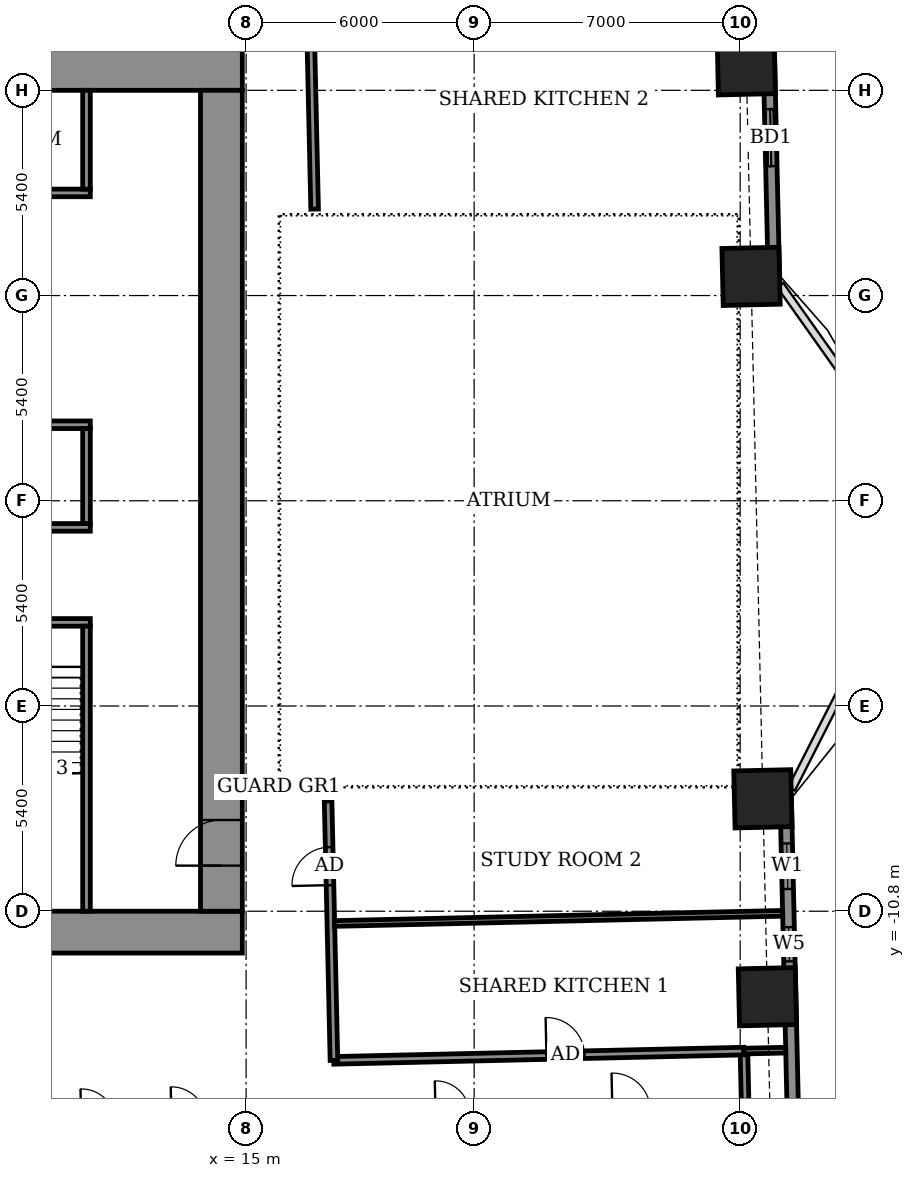
"""IFC4 building model, lengths in metres.
Left out: names, types, materials, properties, quantities, classifications, styles, units other than length and angle.
Written with IfcOpenShell. Run it as: python <this file> out.ifc"""

import sys

from ifc_helpers import new_model, si_unit, direction, frame, frame_2d, origin, origin_2d, place, context, subcontext, project, spatial, rectangle, extrude, element, fill, save


model = new_model("IFC4")
c1 = context("Model", 3, precision=1e-05, world=origin(), true_north=direction((0.0, 1.0)))
c2 = subcontext(c1, "Body", "Model", "MODEL_VIEW")
j1 = project(units=[si_unit("LENGTHUNIT", "METRE"), si_unit("PLANEANGLEUNIT", "RADIAN")], contexts=[c1])
p1 = place(None, origin())
s1 = spatial("IfcSite", under=j1, at=p1, CompositionType="ELEMENT")
p2 = place(p1, origin())
s2 = spatial("IfcBuilding", under=s1, at=p2, CompositionType="ELEMENT")
p3 = place(p2, frame((0.0, 0.0, 48.5)))
s3 = spatial("IfcBuildingStorey", under=s2, at=p3, CompositionType="ELEMENT", Elevation=48.5)
for number, where, z_axis, x_axis in (
    (1, (28.716, -13.049, -0.55), (0.0, 0.0, 1.0), (-0.023, 1.0, 0.0)),
    (2, (28.598, -7.842, -0.55), (0.0, 0.0, 1.0), (-0.023, 1.0, 0.0)),
    (3, (28.286, 5.905, -0.55), (0.0, 0.0, 1.0), (-0.023, 1.0, 0.0)),
    (4, (28.16, 11.445, -0.55), (0.0, 0.0, 1.0), (-0.023, 1.0, 0.0)),
):
    element("IfcColumn", number, at=place(p3, frame(where, z_axis=z_axis, x_axis=x_axis)), inside=s3, PredefinedType="COLUMN", context=c2, shape_type="SweptSolid", body=[
        extrude(rectangle(XDim=1.5, YDim=1.5, at=origin_2d()), origin(), (0.0, 0.0, 1.0), 3.6),
    ])
p4 = place(p3, frame((29.549, -23.299, 0.0), z_axis=(0.0, 0.0, 1.0), x_axis=(-0.022670336976, 0.999742994885, 0.0)))
e5 = element("IfcWall", 5, at=p4, inside=s3, PredefinedType="SOLIDWALL", context=c2, shape_type="SweptSolid", body=[
    extrude(rectangle(XDim=15.529, YDim=0.3, at=frame_2d((7.765, 0.0))), origin(), (0.0, 0.0, 1.0), 3.05),
])
p5 = place(p4, frame((2.119, 0.0, 0.0)))
e6 = element("IfcOpeningElement", 6, at=p5, cuts=e5, PredefinedType="OPENING", context=c2, shape_type="SweptSolid", body=[
    extrude(rectangle(XDim=1.5, YDim=2.4, at=frame_2d((0.75, 1.2))), frame((0.0, 0.16, 0.0), z_axis=(0.0, -1.0, 0.0), x_axis=(1.0, 0.0, 0.0)), (0.0, 0.0, 1.0), 0.32),
])
p6 = place(p4, frame((11.183, 0.0, 0.9)))
e7 = element("IfcOpeningElement", 7, at=p6, cuts=e5, PredefinedType="OPENING", context=c2, shape_type="SweptSolid", body=[
    extrude(rectangle(XDim=0.9, YDim=1.5, at=frame_2d((0.45, 0.75))), frame((0.0, 0.16, 0.0), z_axis=(0.0, -1.0, 0.0), x_axis=(1.0, 0.0, 0.0)), (0.0, 0.0, 1.0), 0.32),
])
p7 = place(p4, frame((13.087, 0.0, 0.9)))
e8 = element("IfcOpeningElement", 8, at=p7, cuts=e5, PredefinedType="OPENING", context=c2, shape_type="SweptSolid", body=[
    extrude(rectangle(XDim=1.2, YDim=1.5, at=frame_2d((0.6, 0.75))), frame((0.0, 0.16, 0.0), z_axis=(0.0, -1.0, 0.0), x_axis=(1.0, 0.0, 0.0)), (0.0, 0.0, 1.0), 0.32),
])
p8 = place(p3, frame((28.887, 5.864, 0.0), z_axis=(0.0, 0.0, 1.0), x_axis=(-0.022687182773, 0.999742612745, 0.0)))
e9 = element("IfcWall", 9, at=p8, inside=s3, PredefinedType="SOLIDWALL", context=c2, shape_type="SweptSolid", body=[
    extrude(rectangle(XDim=16.529, YDim=0.3, at=frame_2d((8.265, 0.0))), origin(), (0.0, 0.0, 1.0), 3.05),
])
p9 = place(p8, frame((2.942, 0.0, 0.0)))
e10 = element("IfcOpeningElement", 10, at=p9, cuts=e9, PredefinedType="OPENING", context=c2, shape_type="SweptSolid", body=[
    extrude(rectangle(XDim=1.5, YDim=2.4, at=frame_2d((0.75, 1.2))), frame((0.0, 0.16, 0.0), z_axis=(0.0, -1.0, 0.0), x_axis=(1.0, 0.0, 0.0)), (0.0, 0.0, 1.0), 0.32),
])
p10 = place(p8, frame((7.629, 0.0, 0.9)))
e11 = element("IfcOpeningElement", 11, at=p10, cuts=e9, PredefinedType="OPENING", context=c2, shape_type="SweptSolid", body=[
    extrude(rectangle(XDim=0.9, YDim=1.5, at=frame_2d((0.45, 0.75))), frame((0.0, 0.16, 0.0), z_axis=(0.0, -1.0, 0.0), x_axis=(1.0, 0.0, 0.0)), (0.0, 0.0, 1.0), 0.32),
])
p11 = place(p8, frame((12.341, 0.0, 0.9)))
e12 = element("IfcOpeningElement", 12, at=p11, cuts=e9, PredefinedType="OPENING", context=c2, shape_type="SweptSolid", body=[
    extrude(rectangle(XDim=2.4, YDim=1.5, at=frame_2d((1.2, 0.75))), frame((0.0, 0.16, 0.0), z_axis=(0.0, -1.0, 0.0), x_axis=(1.0, 0.0, 0.0)), (0.0, 0.0, 1.0), 0.32),
])
p12 = place(p3, frame((30.832, -15.918, 0.0), z_axis=(0.0, 0.0, 1.0), x_axis=(-0.022828630714, 0.999739392852, 0.0)))
e13 = element("IfcWall", 13, at=p12, inside=s3, PredefinedType="USERDEFINED", context=c2, shape_type="SweptSolid", body=[
    extrude(rectangle(XDim=6.0, YDim=0.55, at=frame_2d((3.0, 0.0))), origin(), (0.0, 0.0, 1.0), 0.8),
])
p13 = place(p3, frame((30.33, 6.201, 0.0), z_axis=(0.0, 0.0, 1.0), x_axis=(-0.022744303924, 0.999741314861, 0.0)))
e14 = element("IfcWall", 14, at=p13, inside=s3, PredefinedType="USERDEFINED", context=c2, shape_type="SweptSolid", body=[
    extrude(rectangle(XDim=3.875, YDim=0.55, at=frame_2d((1.938, 0.0))), origin(), (0.0, 0.0, 1.0), 0.8),
])
p14 = place(p3, frame((28.133, -15.979, 0.0), z_axis=(0.0, 0.0, 1.0), x_axis=(-0.022632637625, 0.99974384905, 0.0)))
e15 = element("IfcWall", 15, at=p14, inside=s3, PredefinedType="PARTITIONING", context=c2, shape_type="SweptSolid", body=[
    extrude(rectangle(XDim=1.5, YDim=0.2, at=frame_2d((0.75, 0.0))), origin(), (0.0, 0.0, 1.0), 3.05),
])
p15 = place(p3, frame((17.306, -14.724, 0.0), z_axis=(0.0, 0.0, 1.0), x_axis=(0.999744269809, 0.022614043969, 0.0)))
e16 = element("IfcWall", 16, at=p15, inside=s3, PredefinedType="PARTITIONING", context=c2, shape_type="SweptSolid", body=[
    extrude(rectangle(XDim=10.796, YDim=0.2, at=frame_2d((5.398, 0.0))), origin(), (0.0, 0.0, 1.0), 3.05),
])
p16 = place(p15, frame((5.598, 0.0, 0.0)))
e17 = element("IfcOpeningElement", 17, at=p16, cuts=e16, PredefinedType="OPENING", context=c2, shape_type="SweptSolid", body=[
    extrude(rectangle(XDim=1.0, YDim=2.1, at=frame_2d((0.5, 1.05))), frame((0.0, 0.11, 0.0), z_axis=(0.0, -1.0, 0.0), x_axis=(1.0, 0.0, 0.0)), (0.0, 0.0, 1.0), 0.22),
])
p17 = place(p3, frame((17.311, -14.724, 0.0), z_axis=(0.0, 0.0, 1.0), x_axis=(-0.022562209343, 0.999745440955, 0.0)))
e18 = element("IfcWall", 18, at=p17, inside=s3, PredefinedType="PARTITIONING", context=c2, shape_type="SweptSolid", body=[
    extrude(rectangle(XDim=6.828, YDim=0.2, at=frame_2d((3.414, 0.0))), origin(), (0.0, 0.0, 1.0), 3.05),
])
p18 = place(p17, frame((4.612, 0.0, 0.0)))
e19 = element("IfcOpeningElement", 19, at=p18, cuts=e18, PredefinedType="OPENING", context=c2, shape_type="SweptSolid", body=[
    extrude(rectangle(XDim=1.0, YDim=2.1, at=frame_2d((0.5, 1.05))), frame((0.0, 0.11, 0.0), z_axis=(0.0, -1.0, 0.0), x_axis=(1.0, 0.0, 0.0)), (0.0, 0.0, 1.0), 0.22),
])
p19 = place(p3, frame((28.095, -14.48, 0.0), z_axis=(0.0, 0.0, 1.0), x_axis=(0.999745251335, 0.022570609924, 0.0)))
e20 = element("IfcWall", 20, at=p19, inside=s3, PredefinedType="PARTITIONING", context=c2, shape_type="SweptSolid", body=[
    extrude(rectangle(XDim=1.103, YDim=0.15, at=frame_2d((0.552, 0.0))), origin(), (0.0, 0.0, 1.0), 2.55),
])
p20 = place(p3, frame((17.325, -11.123, 0.0), z_axis=(0.0, 0.0, 1.0), x_axis=(0.999741707298, 0.022727047508, 0.0)))
e21 = element("IfcWall", 21, at=p20, inside=s3, PredefinedType="PARTITIONING", context=c2, shape_type="SweptSolid", body=[
    extrude(rectangle(XDim=11.795, YDim=0.15, at=frame_2d((5.897, 0.0))), origin(), (0.0, 0.0, 1.0), 2.55),
])
p21 = place(p3, frame((16.803, 7.675, 0.0), z_axis=(0.0, 0.0, 1.0), x_axis=(-0.022667483124, 0.999743059595, 0.0)))
e22 = element("IfcWall", 22, at=p21, inside=s3, PredefinedType="PARTITIONING", context=c2, shape_type="SweptSolid", body=[
    extrude(rectangle(XDim=5.245, YDim=0.2, at=frame_2d((2.623, 0.0))), origin(), (0.0, 0.0, 1.0), 3.05),
])
for number, where, z_axis, x_axis in (
    (23, (-14.9, -11.35, 0.0), (0.0, 0.0, 1.0), (1.0, 0.0, 0.0)),
    (24, (-14.9, 11.35, 0.0), (0.0, 0.0, 1.0), (1.0, 0.0, 0.0)),
):
    element("IfcWall", number, at=place(p3, frame(where, z_axis=z_axis, x_axis=x_axis)), inside=s3, PredefinedType="SHEAR", context=c2, shape_type="SweptSolid", body=[
        extrude(rectangle(XDim=29.8, YDim=1.1, at=frame_2d((14.9, 0.0))), origin(), (0.0, 0.0, 1.0), 3.6),
    ])
p22 = place(p3, frame((14.35, -10.8, 0.0), z_axis=(0.0, 0.0, 1.0), x_axis=(0.0, 1.0, 0.0)))
e25 = element("IfcWall", 25, at=p22, inside=s3, PredefinedType="SHEAR", context=c2, shape_type="SweptSolid", body=[
    extrude(rectangle(XDim=21.6, YDim=1.1, at=frame_2d((10.8, 0.0))), origin(), (0.0, 0.0, 1.0), 3.6),
])
p23 = place(p22, frame((1.2, 0.0, 0.0)))
e26 = element("IfcOpeningElement", 26, at=p23, cuts=e25, PredefinedType="OPENING", context=c2, shape_type="SweptSolid", body=[
    extrude(rectangle(XDim=1.2, YDim=2.1, at=frame_2d((0.6, 1.05))), frame((0.0, 0.56, 0.0), z_axis=(0.0, -1.0, 0.0), x_axis=(1.0, 0.0, 0.0)), (0.0, 0.0, 1.0), 1.12),
])
p24 = place(p3, frame((-10.9, -3.2, 0.0), z_axis=(0.0, 0.0, 1.0), x_axis=(1.0, 0.0, 0.0)))
e27 = element("IfcWall", 27, at=p24, inside=s3, PredefinedType="SHEAR", context=c2, shape_type="SweptSolid", body=[
    extrude(rectangle(XDim=21.8, YDim=0.2, at=frame_2d((10.9, 0.0))), origin(), (0.0, 0.0, 1.0), 3.05),
])
p25 = place(p24, frame((1.075, 0.0, 0.0)))
e28 = element("IfcOpeningElement", 28, at=p25, cuts=e27, PredefinedType="OPENING", context=c2, shape_type="SweptSolid", body=[
    extrude(rectangle(XDim=1.1, YDim=2.1, at=frame_2d((0.55, 1.05))), frame((0.0, 0.11, 0.0), z_axis=(0.0, -1.0, 0.0), x_axis=(1.0, 0.0, 0.0)), (0.0, 0.0, 1.0), 0.22),
])
p26 = place(p24, frame((10.325, 0.0, 0.0)))
e29 = element("IfcOpeningElement", 29, at=p26, cuts=e27, PredefinedType="OPENING", context=c2, shape_type="SweptSolid", body=[
    extrude(rectangle(XDim=1.1, YDim=2.1, at=frame_2d((0.55, 1.05))), frame((0.0, 0.11, 0.0), z_axis=(0.0, -1.0, 0.0), x_axis=(1.0, 0.0, 0.0)), (0.0, 0.0, 1.0), 0.22),
])
p27 = place(p24, frame((19.625, 0.0, 0.0)))
e30 = element("IfcOpeningElement", 30, at=p27, cuts=e27, PredefinedType="OPENING", context=c2, shape_type="SweptSolid", body=[
    extrude(rectangle(XDim=1.1, YDim=2.1, at=frame_2d((0.55, 1.05))), frame((0.0, 0.11, 0.0), z_axis=(0.0, -1.0, 0.0), x_axis=(1.0, 0.0, 0.0)), (0.0, 0.0, 1.0), 0.22),
])
p28 = place(p24, frame((5.7, 0.0, 0.0)))
e31 = element("IfcOpeningElement", 31, at=p28, cuts=e27, PredefinedType="OPENING", context=c2, shape_type="SweptSolid", body=[
    extrude(rectangle(XDim=1.1, YDim=2.1, at=frame_2d((0.55, 1.05))), frame((0.0, 0.11, 0.0), z_axis=(0.0, -1.0, 0.0), x_axis=(1.0, 0.0, 0.0)), (0.0, 0.0, 1.0), 0.22),
])
p29 = place(p24, frame((14.975, 0.0, 0.0)))
e32 = element("IfcOpeningElement", 32, at=p29, cuts=e27, PredefinedType="OPENING", context=c2, shape_type="SweptSolid", body=[
    extrude(rectangle(XDim=1.1, YDim=2.1, at=frame_2d((0.55, 1.05))), frame((0.0, 0.11, 0.0), z_axis=(0.0, -1.0, 0.0), x_axis=(1.0, 0.0, 0.0)), (0.0, 0.0, 1.0), 0.22),
])
p30 = place(p3, frame((-10.9, -0.7, 0.0), z_axis=(0.0, 0.0, 1.0), x_axis=(1.0, 0.0, 0.0)))
e33 = element("IfcWall", 33, at=p30, inside=s3, PredefinedType="SHEAR", context=c2, shape_type="SweptSolid", body=[
    extrude(rectangle(XDim=21.8, YDim=0.2, at=frame_2d((10.9, 0.0))), origin(), (0.0, 0.0, 1.0), 3.05),
])
p31 = place(p3, frame((-10.9, 2.0, 0.0), z_axis=(0.0, 0.0, 1.0), x_axis=(1.0, 0.0, 0.0)))
e34 = element("IfcWall", 34, at=p31, inside=s3, PredefinedType="SHEAR", context=c2, shape_type="SweptSolid", body=[
    extrude(rectangle(XDim=21.8, YDim=0.2, at=frame_2d((10.9, 0.0))), origin(), (0.0, 0.0, 1.0), 3.05),
])
p32 = place(p31, frame((0.9, 0.0, 0.0)))
e35 = element("IfcOpeningElement", 35, at=p32, cuts=e34, PredefinedType="OPENING", context=c2, shape_type="SweptSolid", body=[
    extrude(rectangle(XDim=1.1, YDim=2.1, at=frame_2d((0.55, 1.05))), frame((0.0, 0.11, 0.0), z_axis=(0.0, -1.0, 0.0), x_axis=(1.0, 0.0, 0.0)), (0.0, 0.0, 1.0), 0.22),
])
p33 = place(p31, frame((3.6, 0.0, 0.0)))
e36 = element("IfcOpeningElement", 36, at=p33, cuts=e34, PredefinedType="OPENING", context=c2, shape_type="SweptSolid", body=[
    extrude(rectangle(XDim=1.1, YDim=2.1, at=frame_2d((0.55, 1.05))), frame((0.0, 0.11, 0.0), z_axis=(0.0, -1.0, 0.0), x_axis=(1.0, 0.0, 0.0)), (0.0, 0.0, 1.0), 0.22),
])
p34 = place(p31, frame((6.3, 0.0, 0.0)))
e37 = element("IfcOpeningElement", 37, at=p34, cuts=e34, PredefinedType="OPENING", context=c2, shape_type="SweptSolid", body=[
    extrude(rectangle(XDim=1.1, YDim=2.1, at=frame_2d((0.55, 1.05))), frame((0.0, 0.11, 0.0), z_axis=(0.0, -1.0, 0.0), x_axis=(1.0, 0.0, 0.0)), (0.0, 0.0, 1.0), 0.22),
])
p35 = place(p31, frame((9.0, 0.0, 0.0)))
e38 = element("IfcOpeningElement", 38, at=p35, cuts=e34, PredefinedType="OPENING", context=c2, shape_type="SweptSolid", body=[
    extrude(rectangle(XDim=1.1, YDim=2.1, at=frame_2d((0.55, 1.05))), frame((0.0, 0.11, 0.0), z_axis=(0.0, -1.0, 0.0), x_axis=(1.0, 0.0, 0.0)), (0.0, 0.0, 1.0), 0.22),
])
p36 = place(p31, frame((11.7, 0.0, 0.0)))
e39 = element("IfcOpeningElement", 39, at=p36, cuts=e34, PredefinedType="OPENING", context=c2, shape_type="SweptSolid", body=[
    extrude(rectangle(XDim=1.1, YDim=2.1, at=frame_2d((0.55, 1.05))), frame((0.0, 0.11, 0.0), z_axis=(0.0, -1.0, 0.0), x_axis=(1.0, 0.0, 0.0)), (0.0, 0.0, 1.0), 0.22),
])
p37 = place(p31, frame((17.2, 0.0, 0.0)))
e40 = element("IfcOpeningElement", 40, at=p37, cuts=e34, PredefinedType="OPENING", context=c2, shape_type="SweptSolid", body=[
    extrude(rectangle(XDim=0.9, YDim=2.1, at=frame_2d((0.45, 1.05))), frame((0.0, 0.11, 0.0), z_axis=(0.0, -1.0, 0.0), x_axis=(1.0, 0.0, 0.0)), (0.0, 0.0, 1.0), 0.22),
])
p38 = place(p3, frame((-10.9, 8.1, 0.0), z_axis=(0.0, 0.0, 1.0), x_axis=(1.0, 0.0, 0.0)))
e41 = element("IfcWall", 41, at=p38, inside=s3, PredefinedType="SHEAR", context=c2, shape_type="SweptSolid", body=[
    extrude(rectangle(XDim=21.8, YDim=0.2, at=frame_2d((10.9, 0.0))), origin(), (0.0, 0.0, 1.0), 3.05),
])
p39 = place(p38, frame((0.9, 0.0, 0.0)))
e42 = element("IfcOpeningElement", 42, at=p39, cuts=e41, PredefinedType="OPENING", context=c2, shape_type="SweptSolid", body=[
    extrude(rectangle(XDim=1.1, YDim=2.1, at=frame_2d((0.55, 1.05))), frame((0.0, 0.11, 0.0), z_axis=(0.0, -1.0, 0.0), x_axis=(1.0, 0.0, 0.0)), (0.0, 0.0, 1.0), 0.22),
])
p40 = place(p38, frame((3.6, 0.0, 0.0)))
e43 = element("IfcOpeningElement", 43, at=p40, cuts=e41, PredefinedType="OPENING", context=c2, shape_type="SweptSolid", body=[
    extrude(rectangle(XDim=1.1, YDim=2.1, at=frame_2d((0.55, 1.05))), frame((0.0, 0.11, 0.0), z_axis=(0.0, -1.0, 0.0), x_axis=(1.0, 0.0, 0.0)), (0.0, 0.0, 1.0), 0.22),
])
p41 = place(p38, frame((6.3, 0.0, 0.0)))
e44 = element("IfcOpeningElement", 44, at=p41, cuts=e41, PredefinedType="OPENING", context=c2, shape_type="SweptSolid", body=[
    extrude(rectangle(XDim=1.1, YDim=2.1, at=frame_2d((0.55, 1.05))), frame((0.0, 0.11, 0.0), z_axis=(0.0, -1.0, 0.0), x_axis=(1.0, 0.0, 0.0)), (0.0, 0.0, 1.0), 0.22),
])
p42 = place(p38, frame((9.0, 0.0, 0.0)))
e45 = element("IfcOpeningElement", 45, at=p42, cuts=e41, PredefinedType="OPENING", context=c2, shape_type="SweptSolid", body=[
    extrude(rectangle(XDim=1.1, YDim=2.1, at=frame_2d((0.55, 1.05))), frame((0.0, 0.11, 0.0), z_axis=(0.0, -1.0, 0.0), x_axis=(1.0, 0.0, 0.0)), (0.0, 0.0, 1.0), 0.22),
])
p43 = place(p38, frame((11.7, 0.0, 0.0)))
e46 = element("IfcOpeningElement", 46, at=p43, cuts=e41, PredefinedType="OPENING", context=c2, shape_type="SweptSolid", body=[
    extrude(rectangle(XDim=1.1, YDim=2.1, at=frame_2d((0.55, 1.05))), frame((0.0, 0.11, 0.0), z_axis=(0.0, -1.0, 0.0), x_axis=(1.0, 0.0, 0.0)), (0.0, 0.0, 1.0), 0.22),
])
p44 = place(p38, frame((14.5, 0.0, 0.0)))
e47 = element("IfcOpeningElement", 47, at=p44, cuts=e41, PredefinedType="OPENING", context=c2, shape_type="SweptSolid", body=[
    extrude(rectangle(XDim=0.9, YDim=2.1, at=frame_2d((0.45, 1.05))), frame((0.0, 0.11, 0.0), z_axis=(0.0, -1.0, 0.0), x_axis=(1.0, 0.0, 0.0)), (0.0, 0.0, 1.0), 0.22),
])
p45 = place(p38, frame((18.55, 0.0, 0.0)))
e48 = element("IfcOpeningElement", 48, at=p45, cuts=e41, PredefinedType="OPENING", context=c2, shape_type="SweptSolid", body=[
    extrude(rectangle(XDim=0.9, YDim=2.1, at=frame_2d((0.45, 1.05))), frame((0.0, 0.11, 0.0), z_axis=(0.0, -1.0, 0.0), x_axis=(1.0, 0.0, 0.0)), (0.0, 0.0, 1.0), 0.22),
])
p46 = place(p3, frame((10.8, -10.8, 0.0), z_axis=(0.0, 0.0, 1.0), x_axis=(0.0, 1.0, 0.0)))
e49 = element("IfcWall", 49, at=p46, inside=s3, PredefinedType="SHEAR", context=c2, shape_type="SweptSolid", body=[
    extrude(rectangle(XDim=7.5, YDim=0.2, at=frame_2d((3.75, 0.0))), origin(), (0.0, 0.0, 1.0), 3.05),
])
p47 = place(p3, frame((10.8, -0.6, 0.0), z_axis=(0.0, 0.0, 1.0), x_axis=(0.0, 1.0, 0.0)))
e50 = element("IfcWall", 50, at=p47, inside=s3, PredefinedType="STANDARD", context=c2, shape_type="SweptSolid", body=[
    extrude(rectangle(XDim=2.5, YDim=0.2, at=frame_2d((1.25, 0.0))), origin(), (0.0, 0.0, 1.0), 3.05),
])
p48 = place(p3, frame((10.8, 8.2, 0.0), z_axis=(0.0, 0.0, 1.0), x_axis=(0.0, 1.0, 0.0)))
e51 = element("IfcWall", 51, at=p48, inside=s3, PredefinedType="STANDARD", context=c2, shape_type="SweptSolid", body=[
    extrude(rectangle(XDim=2.6, YDim=0.2, at=frame_2d((1.3, 0.0))), origin(), (0.0, 0.0, 1.0), 3.05),
])
p49 = place(p6, origin())
e52 = element("IfcWindow", 52, at=p49, inside=s3, PartitioningType="SINGLE_PANEL", PredefinedType="WINDOW", context=c2, shape_type="SweptSolid", body=[
    extrude(rectangle(XDim=0.9, YDim=1.5, at=frame_2d((0.45, 0.75))), frame((0.0, 0.03, 0.0), z_axis=(0.0, -1.0, 0.0), x_axis=(1.0, 0.0, 0.0)), (0.0, 0.0, 1.0), 0.06),
])
fill(e7, e52)
p50 = place(p7, origin())
e53 = element("IfcWindow", 53, at=p50, inside=s3, PartitioningType="SINGLE_PANEL", PredefinedType="WINDOW", context=c2, shape_type="SweptSolid", body=[
    extrude(rectangle(XDim=1.2, YDim=1.5, at=frame_2d((0.6, 0.75))), frame((0.0, 0.03, 0.0), z_axis=(0.0, -1.0, 0.0), x_axis=(1.0, 0.0, 0.0)), (0.0, 0.0, 1.0), 0.06),
])
fill(e8, e53)
p51 = place(p9, origin())
e54 = element("IfcDoor", 54, at=p51, inside=s3, OperationType="SLIDING_TO_LEFT", PredefinedType="DOOR", context=c2, shape_type="SweptSolid", body=[
    extrude(rectangle(XDim=1.5, YDim=2.4, at=frame_2d((0.75, 1.2))), frame((0.0, 0.025, 0.0), z_axis=(0.0, -1.0, 0.0), x_axis=(1.0, 0.0, 0.0)), (0.0, 0.0, 1.0), 0.05),
])
fill(e10, e54)
p52 = place(p16, origin())
e55 = element("IfcDoor", 55, at=p52, inside=s3, OperationType="SINGLE_SWING_LEFT", PredefinedType="DOOR", context=c2, shape_type="SweptSolid", body=[
    extrude(rectangle(XDim=1.0, YDim=2.1, at=frame_2d((0.5, 1.05))), frame((0.0, 0.025, 0.0), z_axis=(0.0, -1.0, 0.0), x_axis=(1.0, 0.0, 0.0)), (0.0, 0.0, 1.0), 0.05),
])
fill(e17, e55)
p53 = place(p18, origin())
e56 = element("IfcDoor", 56, at=p53, inside=s3, OperationType="SINGLE_SWING_RIGHT", PredefinedType="DOOR", context=c2, shape_type="SweptSolid", body=[
    extrude(rectangle(XDim=1.0, YDim=2.1, at=frame_2d((0.5, 1.05))), frame((0.0, 0.025, 0.0), z_axis=(0.0, -1.0, 0.0), x_axis=(1.0, 0.0, 0.0)), (0.0, 0.0, 1.0), 0.05),
])
fill(e19, e56)
p54 = place(p23, origin())
e57 = element("IfcDoor", 57, at=p54, inside=s3, OperationType="DOUBLE_DOOR_SINGLE_SWING", PredefinedType="DOOR", context=c2, shape_type="SweptSolid", body=[
    extrude(rectangle(XDim=1.2, YDim=2.1, at=frame_2d((0.6, 1.05))), frame((0.0, 0.025, 0.0), z_axis=(0.0, -1.0, 0.0), x_axis=(1.0, 0.0, 0.0)), (0.0, 0.0, 1.0), 0.05),
])
fill(e26, e57)
save(model, sys.argv[1])
